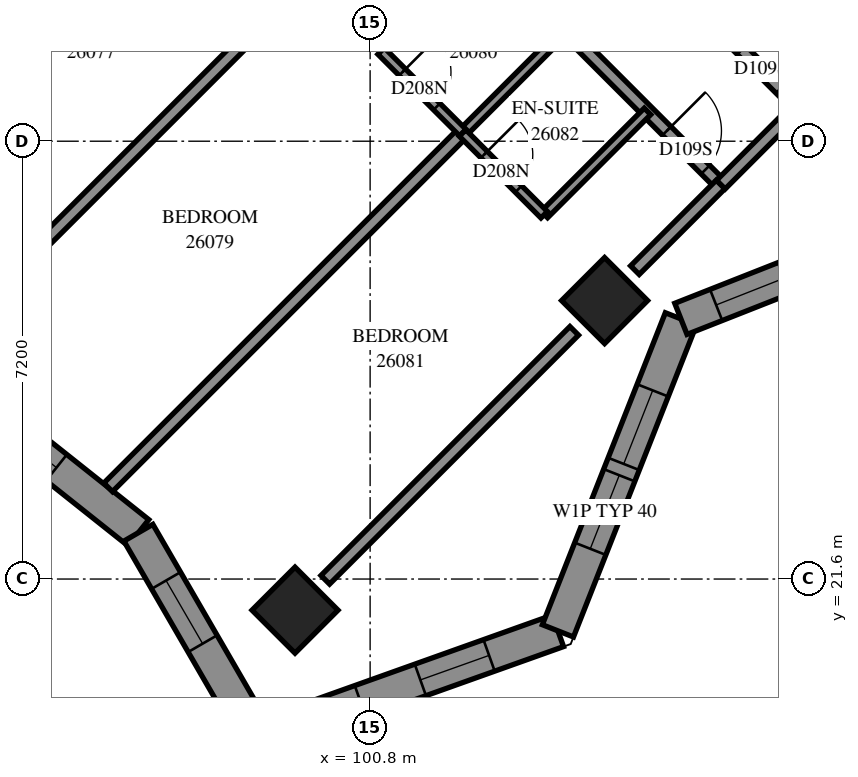
"""IFC4 building model, lengths in metres.
Left out: names, types, materials, properties, quantities, classifications, styles, units other than length and angle.
Written with IfcOpenShell. Run it as: python <this file> out.ifc"""

import sys

from ifc_helpers import new_model, si_unit, direction, frame, frame_2d, origin, origin_2d, place, context, subcontext, project, spatial, polyline, rectangle, outline, extrude, element, fill, save


model = new_model("IFC4")
c1 = context("Model", 3, precision=1e-05, world=origin(), true_north=direction((0.0, 1.0)))
c2 = subcontext(c1, "Body", "Model", "MODEL_VIEW")
j1 = project(units=[si_unit("LENGTHUNIT", "METRE"), si_unit("PLANEANGLEUNIT", "RADIAN")], contexts=[c1])
p1 = place(None, origin())
s1 = spatial("IfcSite", under=j1, at=p1, CompositionType="ELEMENT")
p2 = place(p1, origin())
s2 = spatial("IfcBuilding", under=s1, at=p2, CompositionType="ELEMENT")
p3 = place(p2, frame((0.0, 0.0, 98.2)))
s3 = spatial("IfcBuildingStorey", under=s2, at=p3, CompositionType="ELEMENT", Elevation=98.2)
for number, where, z_axis, x_axis in (
    (1, (104.656, 26.18, 0.0), (0.0, 0.0, 1.0), (0.707, -0.707, 0.0)),
    (2, (99.565, 21.088, 0.0), (0.0, 0.0, 1.0), (0.707, -0.707, 0.0)),
):
    element("IfcColumn", number, at=place(p3, frame(where, z_axis=z_axis, x_axis=x_axis)), inside=s3, PredefinedType="COLUMN", context=c2, shape_type="SweptSolid", body=[
        extrude(rectangle(XDim=1.0, YDim=1.0, at=origin_2d()), origin(), (0.0, 0.0, 1.0), 3.1),
    ])
p4 = place(p3, frame((98.945, 18.984, 0.0), z_axis=(0.0, 0.0, 1.0), x_axis=(0.9418427315, 0.3360539676, 0.0)))
e3 = element("IfcWall", 3, at=p4, inside=s3, PredefinedType="SOLIDWALL", context=c2, shape_type="SweptSolid", body=[
    extrude(outline(polyline([(-0.229, -0.275), (5.374, -0.275), (5.124, 0.275), (0.229, 0.275), (-0.229, -0.275)])), origin(), (0.0, 0.0, 1.0), 3.1),
])
p5 = place(p4, frame((0.599, 0.0, 0.5)))
e4 = element("IfcOpeningElement", 4, at=p5, cuts=e3, PredefinedType="OPENING", context=c2, shape_type="SweptSolid", body=[
    extrude(rectangle(XDim=1.2, YDim=2.45, at=frame_2d((0.6, 1.225))), frame((0.0, 0.285, 0.0), z_axis=(0.0, -1.0, 0.0), x_axis=(1.0, 0.0, 0.0)), (0.0, 0.0, 1.0), 0.57),
])
p6 = place(p4, frame((2.847, 0.0, 0.5)))
e5 = element("IfcOpeningElement", 5, at=p6, cuts=e3, PredefinedType="OPENING", context=c2, shape_type="SweptSolid", body=[
    extrude(rectangle(XDim=1.2, YDim=2.45, at=frame_2d((0.6, 1.225))), frame((0.0, 0.285, 0.0), z_axis=(0.0, -1.0, 0.0), x_axis=(1.0, 0.0, 0.0)), (0.0, 0.0, 1.0), 0.57),
])
p7 = place(p3, frame((103.888, 20.748, 0.0), z_axis=(0.0, 0.0, 1.0), x_axis=(0.3667119279, 0.930334543, 0.0)))
e6 = element("IfcWall", 6, at=p7, inside=s3, PredefinedType="SOLIDWALL", context=c2, shape_type="SweptSolid", body=[
    extrude(outline(polyline([(-0.125, -0.275), (5.395, -0.275), (5.634, 0.275), (0.125, 0.275), (-0.125, -0.275)])), origin(), (0.0, 0.0, 1.0), 3.1),
])
p8 = place(p7, frame((1.451, 0.0, 0.5)))
e7 = element("IfcOpeningElement", 7, at=p8, cuts=e6, PredefinedType="OPENING", context=c2, shape_type="SweptSolid", body=[
    extrude(rectangle(XDim=1.3, YDim=2.45, at=frame_2d((0.65, 1.225))), frame((0.0, 0.285, 0.0), z_axis=(0.0, -1.0, 0.0), x_axis=(1.0, 0.0, 0.0)), (0.0, 0.0, 1.0), 0.57),
])
p9 = place(p7, frame((2.951, 0.0, 0.5)))
e8 = element("IfcOpeningElement", 8, at=p9, cuts=e6, PredefinedType="OPENING", context=c2, shape_type="SweptSolid", body=[
    extrude(rectangle(XDim=1.3, YDim=2.45, at=frame_2d((0.65, 1.225))), frame((0.0, 0.285, 0.0), z_axis=(0.0, -1.0, 0.0), x_axis=(1.0, 0.0, 0.0)), (0.0, 0.0, 1.0), 0.57),
])
p10 = place(p3, frame((105.911, 25.878, 0.0), z_axis=(0.0, 0.0, 1.0), x_axis=(0.930334543, 0.3667119279, 0.0)))
e9 = element("IfcWall", 9, at=p10, inside=s3, PredefinedType="SOLIDWALL", context=c2, shape_type="SweptSolid", body=[
    extrude(outline(polyline([(0.119, -0.275), (5.64, -0.275), (5.39, 0.275), (-0.119, 0.275), (0.119, -0.275)])), origin(), (0.0, 0.0, 1.0), 3.1),
])
p11 = place(p10, frame((0.623, 0.0, 0.5)))
e10 = element("IfcOpeningElement", 10, at=p11, cuts=e9, PredefinedType="OPENING", context=c2, shape_type="SweptSolid", body=[
    extrude(rectangle(XDim=1.2, YDim=2.45, at=frame_2d((0.6, 1.225))), frame((0.0, 0.285, 0.0), z_axis=(0.0, -1.0, 0.0), x_axis=(1.0, 0.0, 0.0)), (0.0, 0.0, 1.0), 0.57),
])
p12 = place(p10, frame((3.118, 0.0, 0.5)))
e11 = element("IfcOpeningElement", 11, at=p12, cuts=e9, PredefinedType="OPENING", context=c2, shape_type="SweptSolid", body=[
    extrude(rectangle(XDim=1.2, YDim=2.45, at=frame_2d((0.6, 1.225))), frame((0.0, 0.285, 0.0), z_axis=(0.0, -1.0, 0.0), x_axis=(1.0, 0.0, 0.0)), (0.0, 0.0, 1.0), 0.57),
])
p13 = place(p3, frame((93.866, 24.843, 0.0), z_axis=(0.0, 0.0, 1.0), x_axis=(0.7829021595, -0.6221448454, 0.0)))
e12 = element("IfcWall", 12, at=p13, inside=s3, PredefinedType="SOLIDWALL", context=c2, shape_type="SweptSolid", body=[
    extrude(outline(polyline([(-0.032, -0.275), (3.937, -0.275), (4.041, 0.275), (0.032, 0.275), (-0.032, -0.275)])), origin(), (0.0, 0.0, 1.0), 3.1),
])
p14 = place(p13, frame((1.068, 0.0, 0.5)))
e13 = element("IfcOpeningElement", 13, at=p14, cuts=e12, PredefinedType="OPENING", context=c2, shape_type="SweptSolid", body=[
    extrude(rectangle(XDim=1.2, YDim=2.45, at=frame_2d((0.6, 1.225))), frame((0.0, 0.285, 0.0), z_axis=(0.0, -1.0, 0.0), x_axis=(1.0, 0.0, 0.0)), (0.0, 0.0, 1.0), 0.57),
])
p15 = place(p3, frame((96.989, 22.362, 0.0), z_axis=(0.0, 0.0, 1.0), x_axis=(0.5010918167, -0.8653941248, 0.0)))
e14 = element("IfcWall", 14, at=p15, inside=s3, PredefinedType="SOLIDWALL", context=c2, shape_type="SweptSolid", body=[
    extrude(outline(polyline([(0.052, -0.275), (4.132, -0.275), (3.674, 0.275), (-0.052, 0.275), (0.052, -0.275)])), origin(), (0.0, 0.0, 1.0), 3.1),
])
p16 = place(p15, frame((0.908, 0.0, 0.5)))
e15 = element("IfcOpeningElement", 15, at=p16, cuts=e14, PredefinedType="OPENING", context=c2, shape_type="SweptSolid", body=[
    extrude(rectangle(XDim=1.2, YDim=2.45, at=frame_2d((0.6, 1.225))), frame((0.0, 0.285, 0.0), z_axis=(0.0, -1.0, 0.0), x_axis=(1.0, 0.0, 0.0)), (0.0, 0.0, 1.0), 0.57),
])
p17 = place(p3, frame((93.339, 41.309, 0.0), z_axis=(0.0, 0.0, 1.0), x_axis=(0.7071067812, -0.7071067812, 0.0)))
e16 = element("IfcWall", 16, at=p17, inside=s3, PredefinedType="PARTITIONING", context=c2, shape_type="SweptSolid", body=[
    extrude(rectangle(XDim=18.702, YDim=0.2, at=frame_2d((9.351, 0.0))), origin(), (0.0, 0.0, 1.0), 3.1),
])
p18 = place(p17, frame((3.05, 0.0, 0.0)))
e17 = element("IfcOpeningElement", 17, at=p18, cuts=e16, PredefinedType="OPENING", context=c2, shape_type="SweptSolid", body=[
    extrude(rectangle(XDim=0.9, YDim=2.1, at=frame_2d((0.45, 1.05))), frame((0.0, 0.11, 0.0), z_axis=(0.0, -1.0, 0.0), x_axis=(1.0, 0.0, 0.0)), (0.0, 0.0, 1.0), 0.22),
])
p19 = place(p17, frame((4.7, 0.0, 0.0)))
e18 = element("IfcOpeningElement", 18, at=p19, cuts=e16, PredefinedType="OPENING", context=c2, shape_type="SweptSolid", body=[
    extrude(rectangle(XDim=0.9, YDim=2.1, at=frame_2d((0.45, 1.05))), frame((0.0, 0.11, 0.0), z_axis=(0.0, -1.0, 0.0), x_axis=(1.0, 0.0, 0.0)), (0.0, 0.0, 1.0), 0.22),
])
p20 = place(p17, frame((10.149, 0.0, 0.0)))
e19 = element("IfcOpeningElement", 19, at=p20, cuts=e16, PredefinedType="OPENING", context=c2, shape_type="SweptSolid", body=[
    extrude(rectangle(XDim=0.9, YDim=2.1, at=frame_2d((0.45, 1.05))), frame((0.0, 0.11, 0.0), z_axis=(0.0, -1.0, 0.0), x_axis=(1.0, 0.0, 0.0)), (0.0, 0.0, 1.0), 0.22),
])
p21 = place(p17, frame((11.9, 0.0, 0.0)))
e20 = element("IfcOpeningElement", 20, at=p21, cuts=e16, PredefinedType="OPENING", context=c2, shape_type="SweptSolid", body=[
    extrude(rectangle(XDim=0.9, YDim=2.1, at=frame_2d((0.45, 1.05))), frame((0.0, 0.11, 0.0), z_axis=(0.0, -1.0, 0.0), x_axis=(1.0, 0.0, 0.0)), (0.0, 0.0, 1.0), 0.22),
])
p22 = place(p17, frame((17.45, 0.0, 0.0)))
e21 = element("IfcOpeningElement", 21, at=p22, cuts=e16, PredefinedType="OPENING", context=c2, shape_type="SweptSolid", body=[
    extrude(rectangle(XDim=0.9, YDim=2.1, at=frame_2d((0.45, 1.05))), frame((0.0, 0.11, 0.0), z_axis=(0.0, -1.0, 0.0), x_axis=(1.0, 0.0, 0.0)), (0.0, 0.0, 1.0), 0.22),
])
p23 = place(p3, frame((96.492, 23.108, 0.0), z_axis=(0.0, 0.0, 1.0), x_axis=(0.7071128444, 0.7071007179, 0.0)))
e22 = element("IfcWall", 22, at=p23, inside=s3, PredefinedType="PARTITIONING", context=c2, shape_type="SweptSolid", body=[
    extrude(rectangle(XDim=8.246, YDim=0.2, at=frame_2d((4.123, 0.0))), origin(), (0.0, 0.0, 1.0), 3.1),
])
p24 = place(p3, frame((91.46, 28.252, 0.0), z_axis=(0.0, 0.0, 1.0), x_axis=(0.7072292282, 0.706984313, 0.0)))
e23 = element("IfcWall", 23, at=p24, inside=s3, PredefinedType="PARTITIONING", context=c2, shape_type="SweptSolid", body=[
    extrude(rectangle(XDim=8.166, YDim=0.2, at=frame_2d((4.083, 0.0))), origin(), (0.0, 0.0, 1.0), 3.1),
])
p25 = place(p3, frame((100.062, 21.588, 0.0), z_axis=(0.0, 0.0, 1.0), x_axis=(0.7071067812, 0.7071067812, 0.0)))
e24 = element("IfcWall", 24, at=p25, inside=s3, PredefinedType="PARTITIONING", context=c2, shape_type="SweptSolid", body=[
    extrude(rectangle(XDim=5.79, YDim=0.2, at=frame_2d((2.895, 0.0))), origin(), (0.0, 0.0, 1.0), 2.6),
])
p26 = place(p3, frame((94.973, 26.681, 0.0), z_axis=(0.0, 0.0, 1.0), x_axis=(0.7071067812, 0.7071067812, 0.0)))
e25 = element("IfcWall", 25, at=p26, inside=s3, PredefinedType="PARTITIONING", context=c2, shape_type="SweptSolid", body=[
    extrude(rectangle(XDim=5.784, YDim=0.2, at=frame_2d((2.892, 0.0))), origin(), (0.0, 0.0, 1.0), 3.1),
])
p27 = place(p3, frame((104.023, 33.184, 0.0), z_axis=(0.0, 0.0, 1.0), x_axis=(0.7071067812, -0.7071067812, 0.0)))
e26 = element("IfcWall", 26, at=p27, inside=s3, PredefinedType="PARTITIONING", context=c2, shape_type="SweptSolid", body=[
    extrude(rectangle(XDim=5.399, YDim=0.2, at=frame_2d((2.7, 0.0))), origin(), (0.0, 0.0, 1.0), 3.1),
])
p28 = place(p27, frame((4.08, 0.0, 0.0)))
e27 = element("IfcOpeningElement", 27, at=p28, cuts=e26, PredefinedType="OPENING", context=c2, shape_type="SweptSolid", body=[
    extrude(rectangle(XDim=0.9, YDim=2.1, at=frame_2d((0.45, 1.05))), frame((0.0, 0.11, 0.0), z_axis=(0.0, -1.0, 0.0), x_axis=(1.0, 0.0, 0.0)), (0.0, 0.0, 1.0), 0.22),
])
p29 = place(p3, frame((100.977, 30.281, 0.0), z_axis=(0.0, 0.0, 1.0), x_axis=(0.7071067812, 0.7071067812, 0.0)))
e28 = element("IfcWall", 28, at=p29, inside=s3, PredefinedType="PARTITIONING", context=c2, shape_type="SweptSolid", body=[
    extrude(rectangle(XDim=2.401, YDim=0.15, at=frame_2d((1.201, 0.0))), origin(), (0.0, 0.0, 1.0), 3.1),
])
for number, where, z_axis, x_axis in (
    (29, (102.323, 28.939, 0.0), (0.0, 0.0, 1.0), (0.707, 0.707, 0.0)),
    (30, (103.665, 27.595, 0.0), (0.0, 0.0, 1.0), (0.707, 0.707, 0.0)),
):
    element("IfcWall", number, at=place(p3, frame(where, z_axis=z_axis, x_axis=x_axis)), inside=s3, PredefinedType="PARTITIONING", context=c2, shape_type="SweptSolid", body=[
        extrude(rectangle(XDim=2.398, YDim=0.15, at=frame_2d((1.199, 0.0))), origin(), (0.0, 0.0, 1.0), 3.1),
    ])
p30 = place(p3, frame((105.154, 26.68, 0.0), z_axis=(0.0, 0.0, 1.0), x_axis=(0.7071067812, 0.7071067812, 0.0)))
e31 = element("IfcWall", 31, at=p30, inside=s3, PredefinedType="PARTITIONING", context=c2, shape_type="SweptSolid", body=[
    extrude(rectangle(XDim=1.994, YDim=0.2, at=frame_2d((0.997, 0.0))), origin(), (0.0, 0.0, 1.0), 2.6),
])
p31 = place(p3, frame((100.981, 30.283, 0.0), z_axis=(0.0, 0.0, 1.0), x_axis=(0.7076330979, -0.7065800724, 0.0)))
e32 = element("IfcWall", 32, at=p31, inside=s3, PredefinedType="PARTITIONING", context=c2, shape_type="SweptSolid", body=[
    extrude(rectangle(XDim=1.899, YDim=0.15, at=frame_2d((0.95, 0.0))), origin(), (0.0, 0.0, 1.0), 3.1),
])
p32 = place(p31, frame((0.493, 0.0, 0.0)))
e33 = element("IfcOpeningElement", 33, at=p32, cuts=e32, PredefinedType="OPENING", context=c2, shape_type="SweptSolid", body=[
    extrude(rectangle(XDim=0.8, YDim=2.1, at=frame_2d((0.4, 1.05))), frame((0.0, 0.085, 0.0), z_axis=(0.0, -1.0, 0.0), x_axis=(1.0, 0.0, 0.0)), (0.0, 0.0, 1.0), 0.17),
])
p33 = place(p3, frame((102.321, 28.935, 0.0), z_axis=(0.0, 0.0, 1.0), x_axis=(0.7065800724, -0.7076330979, 0.0)))
e34 = element("IfcWall", 34, at=p33, inside=s3, PredefinedType="PARTITIONING", context=c2, shape_type="SweptSolid", body=[
    extrude(rectangle(XDim=1.899, YDim=0.15, at=frame_2d((0.95, 0.0))), origin(), (0.0, 0.0, 1.0), 3.1),
])
p34 = place(p33, frame((0.501, 0.0, 0.0)))
e35 = element("IfcOpeningElement", 35, at=p34, cuts=e34, PredefinedType="OPENING", context=c2, shape_type="SweptSolid", body=[
    extrude(rectangle(XDim=0.8, YDim=2.1, at=frame_2d((0.4, 1.05))), frame((0.0, 0.085, 0.0), z_axis=(0.0, -1.0, 0.0), x_axis=(1.0, 0.0, 0.0)), (0.0, 0.0, 1.0), 0.17),
])
p35 = place(p3, frame((106.568, 28.086, 0.0), z_axis=(0.0, 0.0, 1.0), x_axis=(0.7065510983, 0.7076620277, 0.0)))
e36 = element("IfcWall", 36, at=p35, inside=s3, PredefinedType="PARTITIONING", context=c2, shape_type="SweptSolid", body=[
    extrude(rectangle(XDim=1.8, YDim=0.2, at=frame_2d((0.9, 0.0))), origin(), (0.0, 0.0, 1.0), 2.6),
])
p36 = place(p5, origin())
e37 = element("IfcWindow", 37, at=p36, inside=s3, PartitioningType="SINGLE_PANEL", PredefinedType="WINDOW", context=c2, shape_type="SweptSolid", body=[
    extrude(rectangle(XDim=1.2, YDim=2.45, at=frame_2d((0.6, 1.225))), frame((0.0, 0.155, 0.0), z_axis=(0.0, -1.0, 0.0), x_axis=(1.0, 0.0, 0.0)), (0.0, 0.0, 1.0), 0.06),
])
fill(e4, e37)
p37 = place(p6, origin())
e38 = element("IfcWindow", 38, at=p37, inside=s3, PartitioningType="SINGLE_PANEL", PredefinedType="WINDOW", context=c2, shape_type="SweptSolid", body=[
    extrude(rectangle(XDim=1.2, YDim=2.45, at=frame_2d((0.6, 1.225))), frame((0.0, 0.155, 0.0), z_axis=(0.0, -1.0, 0.0), x_axis=(1.0, 0.0, 0.0)), (0.0, 0.0, 1.0), 0.06),
])
fill(e5, e38)
p38 = place(p8, origin())
e39 = element("IfcWindow", 39, at=p38, inside=s3, PartitioningType="SINGLE_PANEL", PredefinedType="WINDOW", context=c2, shape_type="SweptSolid", body=[
    extrude(rectangle(XDim=1.3, YDim=2.45, at=frame_2d((0.65, 1.225))), frame((0.0, 0.155, 0.0), z_axis=(0.0, -1.0, 0.0), x_axis=(1.0, 0.0, 0.0)), (0.0, 0.0, 1.0), 0.06),
])
fill(e7, e39)
p39 = place(p9, origin())
e40 = element("IfcWindow", 40, at=p39, inside=s3, PartitioningType="SINGLE_PANEL", PredefinedType="WINDOW", context=c2, shape_type="SweptSolid", body=[
    extrude(rectangle(XDim=1.3, YDim=2.45, at=frame_2d((0.65, 1.225))), frame((0.0, 0.155, 0.0), z_axis=(0.0, -1.0, 0.0), x_axis=(1.0, 0.0, 0.0)), (0.0, 0.0, 1.0), 0.06),
])
fill(e8, e40)
p40 = place(p11, origin())
e41 = element("IfcWindow", 41, at=p40, inside=s3, PartitioningType="SINGLE_PANEL", PredefinedType="WINDOW", context=c2, shape_type="SweptSolid", body=[
    extrude(rectangle(XDim=1.2, YDim=2.45, at=frame_2d((0.6, 1.225))), frame((0.0, 0.155, 0.0), z_axis=(0.0, -1.0, 0.0), x_axis=(1.0, 0.0, 0.0)), (0.0, 0.0, 1.0), 0.06),
])
fill(e10, e41)
p41 = place(p14, origin())
e42 = element("IfcWindow", 42, at=p41, inside=s3, PartitioningType="SINGLE_PANEL", PredefinedType="WINDOW", context=c2, shape_type="SweptSolid", body=[
    extrude(rectangle(XDim=1.2, YDim=2.45, at=frame_2d((0.6, 1.225))), frame((0.0, 0.155, 0.0), z_axis=(0.0, -1.0, 0.0), x_axis=(1.0, 0.0, 0.0)), (0.0, 0.0, 1.0), 0.06),
])
fill(e13, e42)
p42 = place(p16, origin())
e43 = element("IfcWindow", 43, at=p42, inside=s3, PartitioningType="SINGLE_PANEL", PredefinedType="WINDOW", context=c2, shape_type="SweptSolid", body=[
    extrude(rectangle(XDim=1.2, YDim=2.45, at=frame_2d((0.6, 1.225))), frame((0.0, 0.155, 0.0), z_axis=(0.0, -1.0, 0.0), x_axis=(1.0, 0.0, 0.0)), (0.0, 0.0, 1.0), 0.06),
])
fill(e15, e43)
p43 = place(p32, origin())
e44 = element("IfcDoor", 44, at=p43, inside=s3, OperationType="SINGLE_SWING_RIGHT", PredefinedType="DOOR", context=c2, shape_type="SweptSolid", body=[
    extrude(rectangle(XDim=0.8, YDim=2.1, at=frame_2d((0.4, 1.05))), frame((0.0, 0.025, 0.0), z_axis=(0.0, -1.0, 0.0), x_axis=(1.0, 0.0, 0.0)), (0.0, 0.0, 1.0), 0.05),
])
fill(e33, e44)
p44 = place(p22, origin())
e45 = element("IfcDoor", 45, at=p44, inside=s3, OperationType="SINGLE_SWING_LEFT", PredefinedType="DOOR", context=c2, shape_type="SweptSolid", body=[
    extrude(rectangle(XDim=0.9, YDim=2.1, at=frame_2d((0.45, 1.05))), frame((0.0, 0.025, 0.0), z_axis=(0.0, -1.0, 0.0), x_axis=(1.0, 0.0, 0.0)), (0.0, 0.0, 1.0), 0.05),
])
fill(e21, e45)
p45 = place(p34, origin())
e46 = element("IfcDoor", 46, at=p45, inside=s3, OperationType="SINGLE_SWING_RIGHT", PredefinedType="DOOR", context=c2, shape_type="SweptSolid", body=[
    extrude(rectangle(XDim=0.8, YDim=2.1, at=frame_2d((0.4, 1.05))), frame((0.0, 0.025, 0.0), z_axis=(0.0, -1.0, 0.0), x_axis=(1.0, 0.0, 0.0)), (0.0, 0.0, 1.0), 0.05),
])
fill(e35, e46)
p46 = place(p28, origin())
e47 = element("IfcDoor", 47, at=p46, inside=s3, OperationType="SINGLE_SWING_RIGHT", PredefinedType="DOOR", context=c2, shape_type="SweptSolid", body=[
    extrude(rectangle(XDim=0.9, YDim=2.1, at=frame_2d((0.45, 1.05))), frame((0.0, 0.025, 0.0), z_axis=(0.0, -1.0, 0.0), x_axis=(1.0, 0.0, 0.0)), (0.0, 0.0, 1.0), 0.05),
])
fill(e27, e47)
save(model, sys.argv[1])
